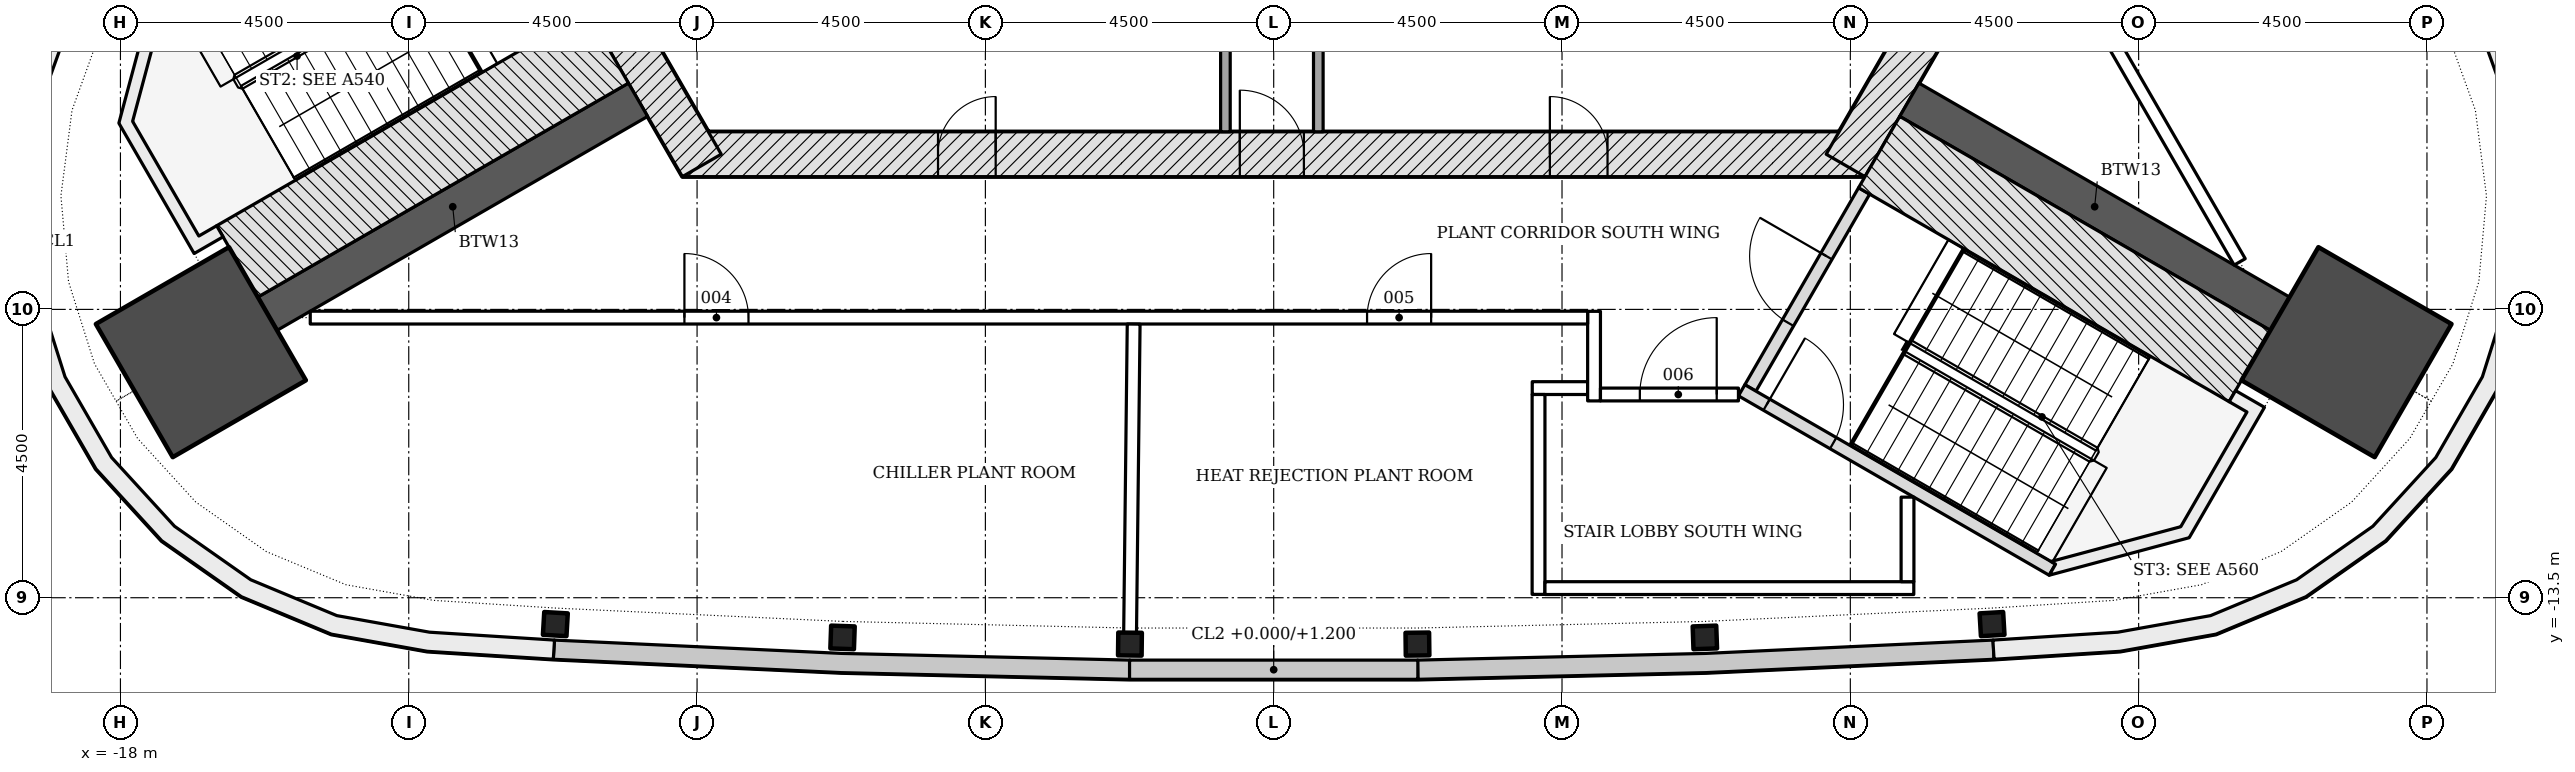
"""IFC4 building model, lengths in metres.
Left out: names, types, materials, properties, quantities, classifications, styles, units other than length and angle.
Written with IfcOpenShell. Run it as: python <this file> out.ifc"""

import sys

from ifc_helpers import new_model, si_unit, direction, frame, frame_2d, origin, origin_2d, place, context, subcontext, project, spatial, polyline, rectangle, i_section, outline, extrude, element, fill, save


model = new_model("IFC4")
c1 = context("Model", 3, precision=1e-05, world=origin(), true_north=direction((0.0, 1.0)))
c2 = subcontext(c1, "Body", "Model", "MODEL_VIEW")
j1 = project(units=[si_unit("LENGTHUNIT", "METRE"), si_unit("PLANEANGLEUNIT", "RADIAN")], contexts=[c1])
p1 = place(None, origin())
s1 = spatial("IfcSite", under=j1, at=p1, CompositionType="ELEMENT")
p2 = place(p1, origin())
s2 = spatial("IfcBuilding", under=s1, at=p2, CompositionType="ELEMENT")
p3 = place(p2, frame((0.0, 0.0, 279.6)))
s3 = spatial("IfcBuildingStorey", under=s2, at=p3, CompositionType="ELEMENT", Elevation=279.6)
p4 = place(p3, frame((-9.229, -6.578, -0.25), z_axis=(0.0, 0.0, 1.0), x_axis=(1.0, 0.0, 0.0)))
e1 = element("IfcWall", 1, at=p4, inside=s3, PredefinedType="SHEAR", context=c2, shape_type="SweptSolid", body=[
    extrude(rectangle(XDim=18.458, YDim=0.7, at=frame_2d((9.229, 0.0))), origin(), (0.0, 0.0, 1.0), 4.5),
])
p5 = place(p4, frame((8.7, 0.0, 0.25)))
e2 = element("IfcOpeningElement", 2, at=p5, cuts=e1, PredefinedType="OPENING", context=c2, shape_type="SweptSolid", body=[
    extrude(rectangle(XDim=1.0, YDim=2.1, at=frame_2d((0.5, 1.05))), frame((0.0, 0.36, 0.0), z_axis=(0.0, -1.0, 0.0), x_axis=(1.0, 0.0, 0.0)), (0.0, 0.0, 1.0), 0.72),
])
p6 = place(p4, frame((3.99, 0.0, 0.25)))
e3 = element("IfcOpeningElement", 3, at=p6, cuts=e1, PredefinedType="OPENING", context=c2, shape_type="SweptSolid", body=[
    extrude(rectangle(XDim=0.9, YDim=2.1, at=frame_2d((0.45, 1.05))), frame((0.0, 0.36, 0.0), z_axis=(0.0, -1.0, 0.0), x_axis=(1.0, 0.0, 0.0)), (0.0, 0.0, 1.0), 0.72),
])
p7 = place(p4, frame((13.539, 0.0, 0.25)))
e4 = element("IfcOpeningElement", 4, at=p7, cuts=e1, PredefinedType="OPENING", context=c2, shape_type="SweptSolid", body=[
    extrude(rectangle(XDim=0.9, YDim=2.1, at=frame_2d((0.45, 1.05))), frame((0.0, 0.36, 0.0), z_axis=(0.0, -1.0, 0.0), x_axis=(1.0, 0.0, 0.0)), (0.0, 0.0, 1.0), 0.72),
])
for number, where, z_axis, x_axis in (
    (5, (8.926, -6.753, -0.25), (0.0, 0.0, 1.0), (0.5, 0.866, 0.0)),
    (6, (-10.311, -4.353, -0.25), (0.0, 0.0, 1.0), (0.5, -0.866, 0.0)),
):
    element("IfcWall", number, at=place(p3, frame(where, z_axis=z_axis, x_axis=x_axis)), inside=s3, PredefinedType="SHEAR", context=c2, shape_type="SweptSolid", body=[
        extrude(rectangle(XDim=2.771, YDim=0.7, at=frame_2d((1.386, 0.0))), origin(), (0.0, 0.0, 1.0), 4.5),
    ])
for number, where, z_axis, x_axis in (
    (7, (-9.922, -5.728, -0.25), (0.0, 0.0, 1.0), (-0.866, -0.5, 0.0)),
    (8, (9.922, -5.728, -0.25), (0.0, 0.0, 1.0), (0.866, -0.5, 0.0)),
):
    element("IfcWall", number, at=place(p3, frame(where, z_axis=z_axis, x_axis=x_axis)), inside=s3, PredefinedType="SHEAR", context=c2, shape_type="SweptSolid", body=[
        extrude(rectangle(XDim=6.678, YDim=0.6, at=frame_2d((3.339, 0.0))), origin(), (0.0, 0.0, 1.0), 4.5),
    ])
for number, where, z_axis, x_axis in (
    (9, (-16.745, -9.667, -0.25), (0.0, 0.0, 1.0), (-0.866, -0.5, 0.0)),
    (10, (16.745, -9.667, -0.25), (0.0, 0.0, 1.0), (0.866, -0.5, 0.0)),
):
    element("IfcColumn", number, at=place(p3, frame(where, z_axis=z_axis, x_axis=x_axis)), inside=s3, PredefinedType="COLUMN", context=c2, shape_type="SweptSolid", body=[
        extrude(rectangle(XDim=2.4, YDim=2.4, at=origin_2d()), origin(), (0.0, 0.0, 1.0), 4.5),
    ])
for number, where, z_axis, x_axis in (
    (11, (-11.212, -13.911, -0.25), (0.0, 0.0, 1.0), (0.998, -0.058, 0.0)),
    (12, (-6.729, -14.119, -0.25), (0.0, 0.0, 1.0), (0.999, -0.035, 0.0)),
    (13, (-2.244, -14.224, -0.25), (0.0, 0.0, 1.0), (1.0, -0.012, 0.0)),
    (14, (2.244, -14.224, -0.25), (0.0, 0.0, 1.0), (1.0, 0.012, 0.0)),
    (15, (6.729, -14.119, -0.25), (0.0, 0.0, 1.0), (0.999, 0.035, 0.0)),
    (16, (11.212, -13.911, -0.25), (0.0, 0.0, 1.0), (0.998, 0.058, 0.0)),
):
    element("IfcColumn", number, at=place(p3, frame(where, z_axis=z_axis, x_axis=x_axis)), inside=s3, PredefinedType="COLUMN", context=c2, shape_type="SweptSolid", body=[
        extrude(i_section(OverallWidth=0.368, OverallDepth=0.356, WebThickness=0.011, FlangeThickness=0.018, FilletRadius=0.015, at=origin_2d()), origin(), (0.0, 0.0, 1.0), 4.5),
    ])
p8 = place(p3, origin())
e17 = element("IfcWall", 17, at=p8, inside=s3, PredefinedType="NOTDEFINED", context=c2, shape_type="SweptSolid", body=[
    extrude(outline(polyline([(-11.244, -14.46), (-6.749, -14.669), (-2.25, -14.773), (-2.243, -14.474), (-6.738, -14.369), (-11.23, -14.161), (-11.244, -14.46)])), origin(), (0.0, 0.0, 1.0), 4.25),
])
p9 = place(p3, origin())
e18 = element("IfcWall", 18, at=p9, inside=s3, PredefinedType="NOTDEFINED", context=c2, shape_type="SweptSolid", body=[
    extrude(outline(polyline([(2.25, -14.773), (6.749, -14.669), (11.244, -14.46), (11.23, -14.161), (6.738, -14.369), (2.243, -14.474), (2.25, -14.773)])), origin(), (0.0, 0.0, 1.0), 4.25),
])
p10 = place(p3, origin())
e19 = element("IfcWall", 19, at=p10, inside=s3, PredefinedType="NOTDEFINED", context=c2, shape_type="SweptSolid", body=[
    extrude(outline(polyline([(-2.25, -14.773), (2.25, -14.773), (2.25, -14.473), (-2.25, -14.473), (-2.25, -14.773)])), origin(), (0.0, 0.0, 1.0), 1.2),
])
p11 = place(p3, origin())
e20 = element("IfcWall", 20, at=p11, inside=s3, PredefinedType="NOTDEFINED", context=c2, shape_type="SweptSolid", body=[
    extrude(outline(polyline([(-18.145, -2.507), (-19.021, -4.273), (-19.538, -5.703), (-19.733, -7.21), (-19.599, -8.724), (-19.141, -10.174), (-18.381, -11.49), (-17.355, -12.611), (-16.111, -13.485), (-14.708, -14.069), (-13.211, -14.336), (-11.244, -14.46), (-11.225, -14.161), (-13.176, -14.038), (-14.623, -13.779), (-15.965, -13.22), (-17.156, -12.385), (-18.138, -11.312), (-18.865, -10.052), (-19.303, -8.665), (-19.432, -7.216), (-19.244, -5.774), (-18.745, -4.391), (-17.876, -2.64), (-18.145, -2.507)])), origin(), (0.0, 0.0, 1.0), 4.25),
])
p12 = place(p3, origin())
e21 = element("IfcWall", 21, at=p12, inside=s3, PredefinedType="NOTDEFINED", context=c2, shape_type="SweptSolid", body=[
    extrude(outline(polyline([(11.244, -14.46), (13.211, -14.336), (14.708, -14.069), (16.111, -13.485), (17.355, -12.611), (18.381, -11.49), (19.141, -10.174), (19.599, -8.724), (19.733, -7.21), (19.538, -5.703), (19.021, -4.273), (18.145, -2.507), (17.876, -2.64), (18.745, -4.391), (19.244, -5.774), (19.432, -7.216), (19.303, -8.665), (18.865, -10.052), (18.138, -11.312), (17.156, -12.385), (15.965, -13.22), (14.623, -13.779), (13.176, -14.038), (11.225, -14.161), (11.244, -14.46)])), origin(), (0.0, 0.0, 1.0), 4.25),
])
p13 = place(p3, frame((-0.754, 10.756, 0.0), z_axis=(0.0, 0.0, 1.0), x_axis=(0.0, -1.0, 0.0)))
e22 = element("IfcWall", 22, at=p13, inside=s3, PredefinedType="PARTITIONING", context=c2, shape_type="SweptSolid", body=[
    extrude(rectangle(XDim=16.985, YDim=0.15, at=frame_2d((8.492, 0.0))), origin(), (0.0, 0.0, 1.0), 4.25),
])
p14 = place(p13, frame((9.185, 0.0, 0.0)))
e23 = element("IfcOpeningElement", 23, at=p14, cuts=e22, PredefinedType="OPENING", context=c2, shape_type="SweptSolid", body=[
    extrude(rectangle(XDim=0.9, YDim=2.1, at=frame_2d((0.45, 1.05))), frame((0.0, 0.085, 0.0), z_axis=(0.0, -1.0, 0.0), x_axis=(1.0, 0.0, 0.0)), (0.0, 0.0, 1.0), 0.17),
])
p15 = place(p3, frame((0.696, 5.197, 0.0), z_axis=(0.0, 0.0, 1.0), x_axis=(0.0, -1.0, 0.0)))
e24 = element("IfcWall", 24, at=p15, inside=s3, PredefinedType="PARTITIONING", context=c2, shape_type="SweptSolid", body=[
    extrude(rectangle(XDim=11.425, YDim=0.15, at=frame_2d((5.712, 0.0))), origin(), (0.0, 0.0, 1.0), 4.25),
])
p16 = place(p15, frame((3.664, 0.0, 0.0)))
e25 = element("IfcOpeningElement", 25, at=p16, cuts=e24, PredefinedType="OPENING", context=c2, shape_type="SweptSolid", body=[
    extrude(rectangle(XDim=0.9, YDim=2.1, at=frame_2d((0.45, 1.05))), frame((0.0, 0.085, 0.0), z_axis=(0.0, -1.0, 0.0), x_axis=(1.0, 0.0, 0.0)), (0.0, 0.0, 1.0), 0.17),
])
p17 = place(p3, frame((-10.393, -4.912, -0.25), z_axis=(0.0, 0.0, 1.0), x_axis=(-0.866025486527, -0.499999856685, 0.0)))
e26 = element("IfcWall", 26, at=p17, inside=s3, PredefinedType="SHEAR", context=c2, shape_type="SweptSolid", body=[
    extrude(rectangle(XDim=6.679, YDim=1.286, at=frame_2d((3.339, 0.0))), origin(), (0.0, 0.0, 1.0), 4.5),
])
p18 = place(p3, frame((0.0, 0.0, -0.25)))
e27 = element("IfcWall", 27, at=p18, inside=s3, PredefinedType="SHEAR", context=c2, shape_type="SweptSolid", body=[
    extrude(outline(polyline([(-17.439, -3.907), (-18.025, -6.093), (-16.85, -8.128), (-16.398, -7.867), (-16.498, -7.694), (-16.498, -7.694), (-16.777, -7.855), (-17.81, -6.065), (-17.267, -4.039), (-17.339, -4.081), (-17.339, -4.081), (-17.339, -4.081), (-17.339, -4.081), (-17.339, -4.081), (-17.339, -4.081), (-17.339, -4.081), (-17.339, -4.081), (-17.339, -4.081), (-17.339, -4.081), (-17.339, -4.081), (-17.339, -4.081), (-17.339, -4.081), (-17.339, -4.081), (-17.339, -4.081), (-17.339, -4.081), (-17.339, -4.081), (-17.439, -3.907)])), origin(), (0.0, 0.0, 1.0), 4.5),
])
p19 = place(p3, frame((7.44, -10.226, -0.25), z_axis=(0.0, 0.0, 1.0), x_axis=(0.500022077904, 0.866012656725, 0.0)))
e28 = element("IfcWall", 28, at=p19, inside=s3, PredefinedType="SHEAR", context=c2, shape_type="SweptSolid", body=[
    extrude(rectangle(XDim=3.55, YDim=0.2, at=frame_2d((1.775, 0.0))), origin(), (0.0, 0.0, 1.0), 4.5),
])
p20 = place(p19, frame((1.175, 0.0, 0.25)))
e29 = element("IfcOpeningElement", 29, at=p20, cuts=e28, PredefinedType="OPENING", context=c2, shape_type="SweptSolid", body=[
    extrude(rectangle(XDim=1.2, YDim=2.1, at=frame_2d((0.6, 1.05))), frame((0.0, 0.11, 0.0), z_axis=(0.0, -1.0, 0.0), x_axis=(1.0, 0.0, 0.0)), (0.0, 0.0, 1.0), 0.22),
])
p21 = place(p3, frame((7.304, -10.262, -0.25), z_axis=(0.0, 0.0, 1.0), x_axis=(0.866026594901, -0.49999793692, 0.0)))
e30 = element("IfcWall", 30, at=p21, inside=s3, PredefinedType="SHEAR", context=c2, shape_type="SweptSolid", body=[
    extrude(rectangle(XDim=5.6, YDim=0.2, at=frame_2d((2.8, 0.0))), origin(), (0.0, 0.0, 1.0), 4.5),
])
p22 = place(p21, frame((0.45, 0.0, 0.25)))
e31 = element("IfcOpeningElement", 31, at=p22, cuts=e30, PredefinedType="OPENING", context=c2, shape_type="SweptSolid", body=[
    extrude(rectangle(XDim=1.2, YDim=2.1, at=frame_2d((0.6, 1.05))), frame((0.0, 0.11, 0.0), z_axis=(0.0, -1.0, 0.0), x_axis=(1.0, 0.0, 0.0)), (0.0, 0.0, 1.0), 0.22),
])
p23 = place(p3, frame((9.45, -6.545, -0.25), z_axis=(0.0, 0.0, 1.0), x_axis=(0.866016347338, -0.500015685897, 0.0)))
e32 = element("IfcWall", 32, at=p23, inside=s3, PredefinedType="SHEAR", context=c2, shape_type="SweptSolid", body=[
    extrude(rectangle(XDim=6.678, YDim=1.286, at=frame_2d((3.339, 0.0))), origin(), (0.0, 0.0, 1.0), 4.5),
])
p24 = place(p3, frame((0.0, 0.0, -0.25)))
e33 = element("IfcWall", 33, at=p24, inside=s3, PredefinedType="SHEAR", context=c2, shape_type="SweptSolid", body=[
    extrude(outline(polyline([(12.104, -13.149), (14.289, -12.563), (15.464, -10.528), (15.013, -10.268), (14.913, -10.441), (15.191, -10.601), (14.157, -12.392), (12.132, -12.934), (12.204, -12.976), (12.204, -12.976), (12.204, -12.976), (12.204, -12.976), (12.204, -12.976), (12.204, -12.976), (12.204, -12.976), (12.204, -12.976), (12.204, -12.976), (12.204, -12.976), (12.204, -12.976), (12.204, -12.976), (12.204, -12.976), (12.204, -12.976), (12.204, -12.976), (12.204, -12.976), (12.204, -12.976), (12.104, -13.149)])), origin(), (0.0, 0.0, 1.0), 4.5),
])
p25 = place(p3, frame((4.036, -10.228, 0.0), z_axis=(0.0, 0.0, 1.0), x_axis=(1.0, 0.0, 0.0)))
e34 = element("IfcWall", 34, at=p25, inside=s3, PredefinedType="PARTITIONING", context=c2, shape_type="SweptSolid", body=[
    extrude(rectangle(XDim=0.864, YDim=0.2, at=frame_2d((0.432, 0.0))), origin(), (0.0, 0.0, 1.0), 4.25),
])
p26 = place(p3, frame((5.0, -10.428, 0.0), z_axis=(0.0, 0.0, 1.0), x_axis=(0.0, 1.0, 0.0)))
e35 = element("IfcWall", 35, at=p26, inside=s3, PredefinedType="PARTITIONING", context=c2, shape_type="SweptSolid", body=[
    extrude(rectangle(XDim=1.398, YDim=0.2, at=frame_2d((0.699, 0.0))), origin(), (0.0, 0.0, 1.0), 4.25),
])
p27 = place(p3, frame((5.1, -10.328, 0.0), z_axis=(0.0, 0.0, 1.0), x_axis=(1.0, 0.0, 0.0)))
e36 = element("IfcWall", 36, at=p27, inside=s3, PredefinedType="PARTITIONING", context=c2, shape_type="SweptSolid", body=[
    extrude(rectangle(XDim=2.154, YDim=0.2, at=frame_2d((1.077, 0.0))), origin(), (0.0, 0.0, 1.0), 3.702),
])
p28 = place(p27, frame((0.615, 0.0, 0.0)))
e37 = element("IfcOpeningElement", 37, at=p28, cuts=e36, PredefinedType="OPENING", context=c2, shape_type="SweptSolid", body=[
    extrude(rectangle(XDim=1.2, YDim=2.1, at=frame_2d((0.6, 1.05))), frame((0.0, 0.11, 0.0), z_axis=(0.0, -1.0, 0.0), x_axis=(1.0, 0.0, 0.0)), (0.0, 0.0, 1.0), 0.22),
])
p29 = place(p3, frame((-15.037, -9.128, 0.0), z_axis=(0.0, 0.0, 1.0), x_axis=(1.0, 0.0, 0.0)))
e38 = element("IfcWall", 38, at=p29, inside=s3, PredefinedType="PARTITIONING", context=c2, shape_type="SweptSolid", body=[
    extrude(rectangle(XDim=19.937, YDim=0.2, at=frame_2d((9.969, 0.0))), origin(), (0.0, 0.0, 1.0), 3.702),
])
p30 = place(p29, frame((5.84, 0.0, 0.0)))
e39 = element("IfcOpeningElement", 39, at=p30, cuts=e38, PredefinedType="OPENING", context=c2, shape_type="SweptSolid", body=[
    extrude(rectangle(XDim=1.0, YDim=2.1, at=frame_2d((0.5, 1.05))), frame((0.0, 0.11, 0.0), z_axis=(0.0, -1.0, 0.0), x_axis=(1.0, 0.0, 0.0)), (0.0, 0.0, 1.0), 0.22),
])
p31 = place(p29, frame((16.495, 0.0, 0.0)))
e40 = element("IfcOpeningElement", 40, at=p31, cuts=e38, PredefinedType="OPENING", context=c2, shape_type="SweptSolid", body=[
    extrude(rectangle(XDim=1.0, YDim=2.1, at=frame_2d((0.5, 1.05))), frame((0.0, 0.11, 0.0), z_axis=(0.0, -1.0, 0.0), x_axis=(1.0, 0.0, 0.0)), (0.0, 0.0, 1.0), 0.22),
])
p32 = place(p3, frame((-2.242, -14.073, 0.0), z_axis=(0.0, 0.0, 1.0), x_axis=(0.011540988294, 0.999933400577, 0.0)))
e41 = element("IfcWall", 41, at=p32, inside=s3, PredefinedType="PARTITIONING", context=c2, shape_type="SweptSolid", body=[
    extrude(rectangle(XDim=4.844, YDim=0.2, at=frame_2d((2.422, 0.0))), origin(), (0.0, 0.0, 1.0), 3.702),
])
p33 = place(p3, frame((4.134, -10.328, 0.0), z_axis=(0.0, 0.0, 1.0), x_axis=(0.0, -1.0, 0.0)))
e42 = element("IfcWall", 42, at=p33, inside=s3, PredefinedType="PARTITIONING", context=c2, shape_type="SweptSolid", body=[
    extrude(rectangle(XDim=3.12, YDim=0.2, at=frame_2d((1.56, 0.0))), origin(), (0.0, 0.0, 1.0), 4.25),
])
p34 = place(p3, frame((4.234, -13.35, 0.0), z_axis=(0.0, 0.0, 1.0), x_axis=(1.0, 0.0, 0.0)))
e43 = element("IfcWall", 43, at=p34, inside=s3, PredefinedType="PARTITIONING", context=c2, shape_type="SweptSolid", body=[
    extrude(rectangle(XDim=5.757, YDim=0.2, at=frame_2d((2.878, 0.0))), origin(), (0.0, 0.0, 1.0), 3.702),
])
p35 = place(p3, frame((9.893, -13.25, 0.0), z_axis=(0.0, 0.0, 1.0), x_axis=(0.0, 1.0, 0.0)))
e44 = element("IfcWall", 44, at=p35, inside=s3, PredefinedType="PARTITIONING", context=c2, shape_type="SweptSolid", body=[
    extrude(rectangle(XDim=1.32, YDim=0.2, at=frame_2d((0.66, 0.0))), origin(), (0.0, 0.0, 1.0), 4.25),
])
p36 = place(p3, frame((5.282, 8.708, 0.0), z_axis=(0.0, 0.0, 1.0), x_axis=(0.500001848211, -0.866024336717, 0.0)))
e45 = element("IfcWall", 45, at=p36, inside=s3, PredefinedType="PARTITIONING", context=c2, shape_type="SweptSolid", body=[
    extrude(rectangle(XDim=19.591, YDim=0.2, at=frame_2d((9.795, 0.0))), origin(), (0.0, 0.0, 1.0), 3.702),
])
p37 = place(p36, frame((10.741, 0.0, 0.0)))
e46 = element("IfcOpeningElement", 46, at=p37, cuts=e45, PredefinedType="OPENING", context=c2, shape_type="SweptSolid", body=[
    extrude(rectangle(XDim=1.0, YDim=2.1, at=frame_2d((0.5, 1.05))), frame((0.0, 0.11, 0.0), z_axis=(0.0, -1.0, 0.0), x_axis=(1.0, 0.0, 0.0)), (0.0, 0.0, 1.0), 0.22),
])
p38 = place(p36, frame((0.965, 0.0, 0.0)))
e47 = element("IfcOpeningElement", 47, at=p38, cuts=e45, PredefinedType="OPENING", context=c2, shape_type="SweptSolid", body=[
    extrude(rectangle(XDim=1.0, YDim=2.1, at=frame_2d((0.5, 1.05))), frame((0.0, 0.11, 0.0), z_axis=(0.0, -1.0, 0.0), x_axis=(1.0, 0.0, 0.0)), (0.0, 0.0, 1.0), 0.22),
])
p39 = place(p5, origin())
e48 = element("IfcDoor", 48, at=p39, inside=s3, OperationType="SINGLE_SWING_LEFT", PredefinedType="DOOR", context=c2, shape_type="SweptSolid", body=[
    extrude(rectangle(XDim=1.0, YDim=2.1, at=frame_2d((0.5, 1.05))), frame((0.0, 0.075, 0.0), z_axis=(0.0, -1.0, 0.0), x_axis=(1.0, 0.0, 0.0)), (0.0, 0.0, 1.0), 0.15),
])
fill(e2, e48)
p40 = place(p6, origin())
e49 = element("IfcDoor", 49, at=p40, inside=s3, OperationType="SINGLE_SWING_RIGHT", PredefinedType="DOOR", context=c2, shape_type="SweptSolid", body=[
    extrude(rectangle(XDim=0.9, YDim=2.1, at=frame_2d((0.45, 1.05))), frame((0.0, 0.075, 0.0), z_axis=(0.0, -1.0, 0.0), x_axis=(1.0, 0.0, 0.0)), (0.0, 0.0, 1.0), 0.15),
])
fill(e3, e49)
p41 = place(p7, origin())
e50 = element("IfcDoor", 50, at=p41, inside=s3, OperationType="SINGLE_SWING_LEFT", PredefinedType="DOOR", context=c2, shape_type="SweptSolid", body=[
    extrude(rectangle(XDim=0.9, YDim=2.1, at=frame_2d((0.45, 1.05))), frame((0.0, 0.075, 0.0), z_axis=(0.0, -1.0, 0.0), x_axis=(1.0, 0.0, 0.0)), (0.0, 0.0, 1.0), 0.15),
])
fill(e4, e50)
p42 = place(p20, origin())
e51 = element("IfcDoor", 51, at=p42, inside=s3, OperationType="SINGLE_SWING_RIGHT", PredefinedType="DOOR", context=c2, shape_type="SweptSolid", body=[
    extrude(rectangle(XDim=1.2, YDim=2.1, at=frame_2d((0.6, 1.05))), frame((0.0, 0.025, 0.0), z_axis=(0.0, -1.0, 0.0), x_axis=(1.0, 0.0, 0.0)), (0.0, 0.0, 1.0), 0.05),
])
fill(e29, e51)
p43 = place(p22, origin())
e52 = element("IfcDoor", 52, at=p43, inside=s3, OperationType="SINGLE_SWING_LEFT", PredefinedType="DOOR", context=c2, shape_type="SweptSolid", body=[
    extrude(rectangle(XDim=1.2, YDim=2.1, at=frame_2d((0.6, 1.05))), frame((0.0, 0.025, 0.0), z_axis=(0.0, -1.0, 0.0), x_axis=(1.0, 0.0, 0.0)), (0.0, 0.0, 1.0), 0.05),
])
fill(e31, e52)
p44 = place(p30, origin())
e53 = element("IfcDoor", 53, at=p44, inside=s3, OperationType="SINGLE_SWING_LEFT", PredefinedType="DOOR", context=c2, shape_type="SweptSolid", body=[
    extrude(rectangle(XDim=1.0, YDim=2.1, at=frame_2d((0.5, 1.05))), frame((0.0, 0.025, 0.0), z_axis=(0.0, -1.0, 0.0), x_axis=(1.0, 0.0, 0.0)), (0.0, 0.0, 1.0), 0.05),
])
fill(e39, e53)
p45 = place(p31, origin())
e54 = element("IfcDoor", 54, at=p45, inside=s3, OperationType="SINGLE_SWING_RIGHT", PredefinedType="DOOR", context=c2, shape_type="SweptSolid", body=[
    extrude(rectangle(XDim=1.0, YDim=2.1, at=frame_2d((0.5, 1.05))), frame((0.0, 0.025, 0.0), z_axis=(0.0, -1.0, 0.0), x_axis=(1.0, 0.0, 0.0)), (0.0, 0.0, 1.0), 0.05),
])
fill(e40, e54)
p46 = place(p28, origin())
e55 = element("IfcDoor", 55, at=p46, inside=s3, OperationType="SINGLE_SWING_RIGHT", PredefinedType="DOOR", context=c2, shape_type="SweptSolid", body=[
    extrude(rectangle(XDim=1.2, YDim=2.1, at=frame_2d((0.6, 1.05))), frame((0.0, 0.025, 0.0), z_axis=(0.0, -1.0, 0.0), x_axis=(1.0, 0.0, 0.0)), (0.0, 0.0, 1.0), 0.05),
])
fill(e37, e55)
save(model, sys.argv[1])
